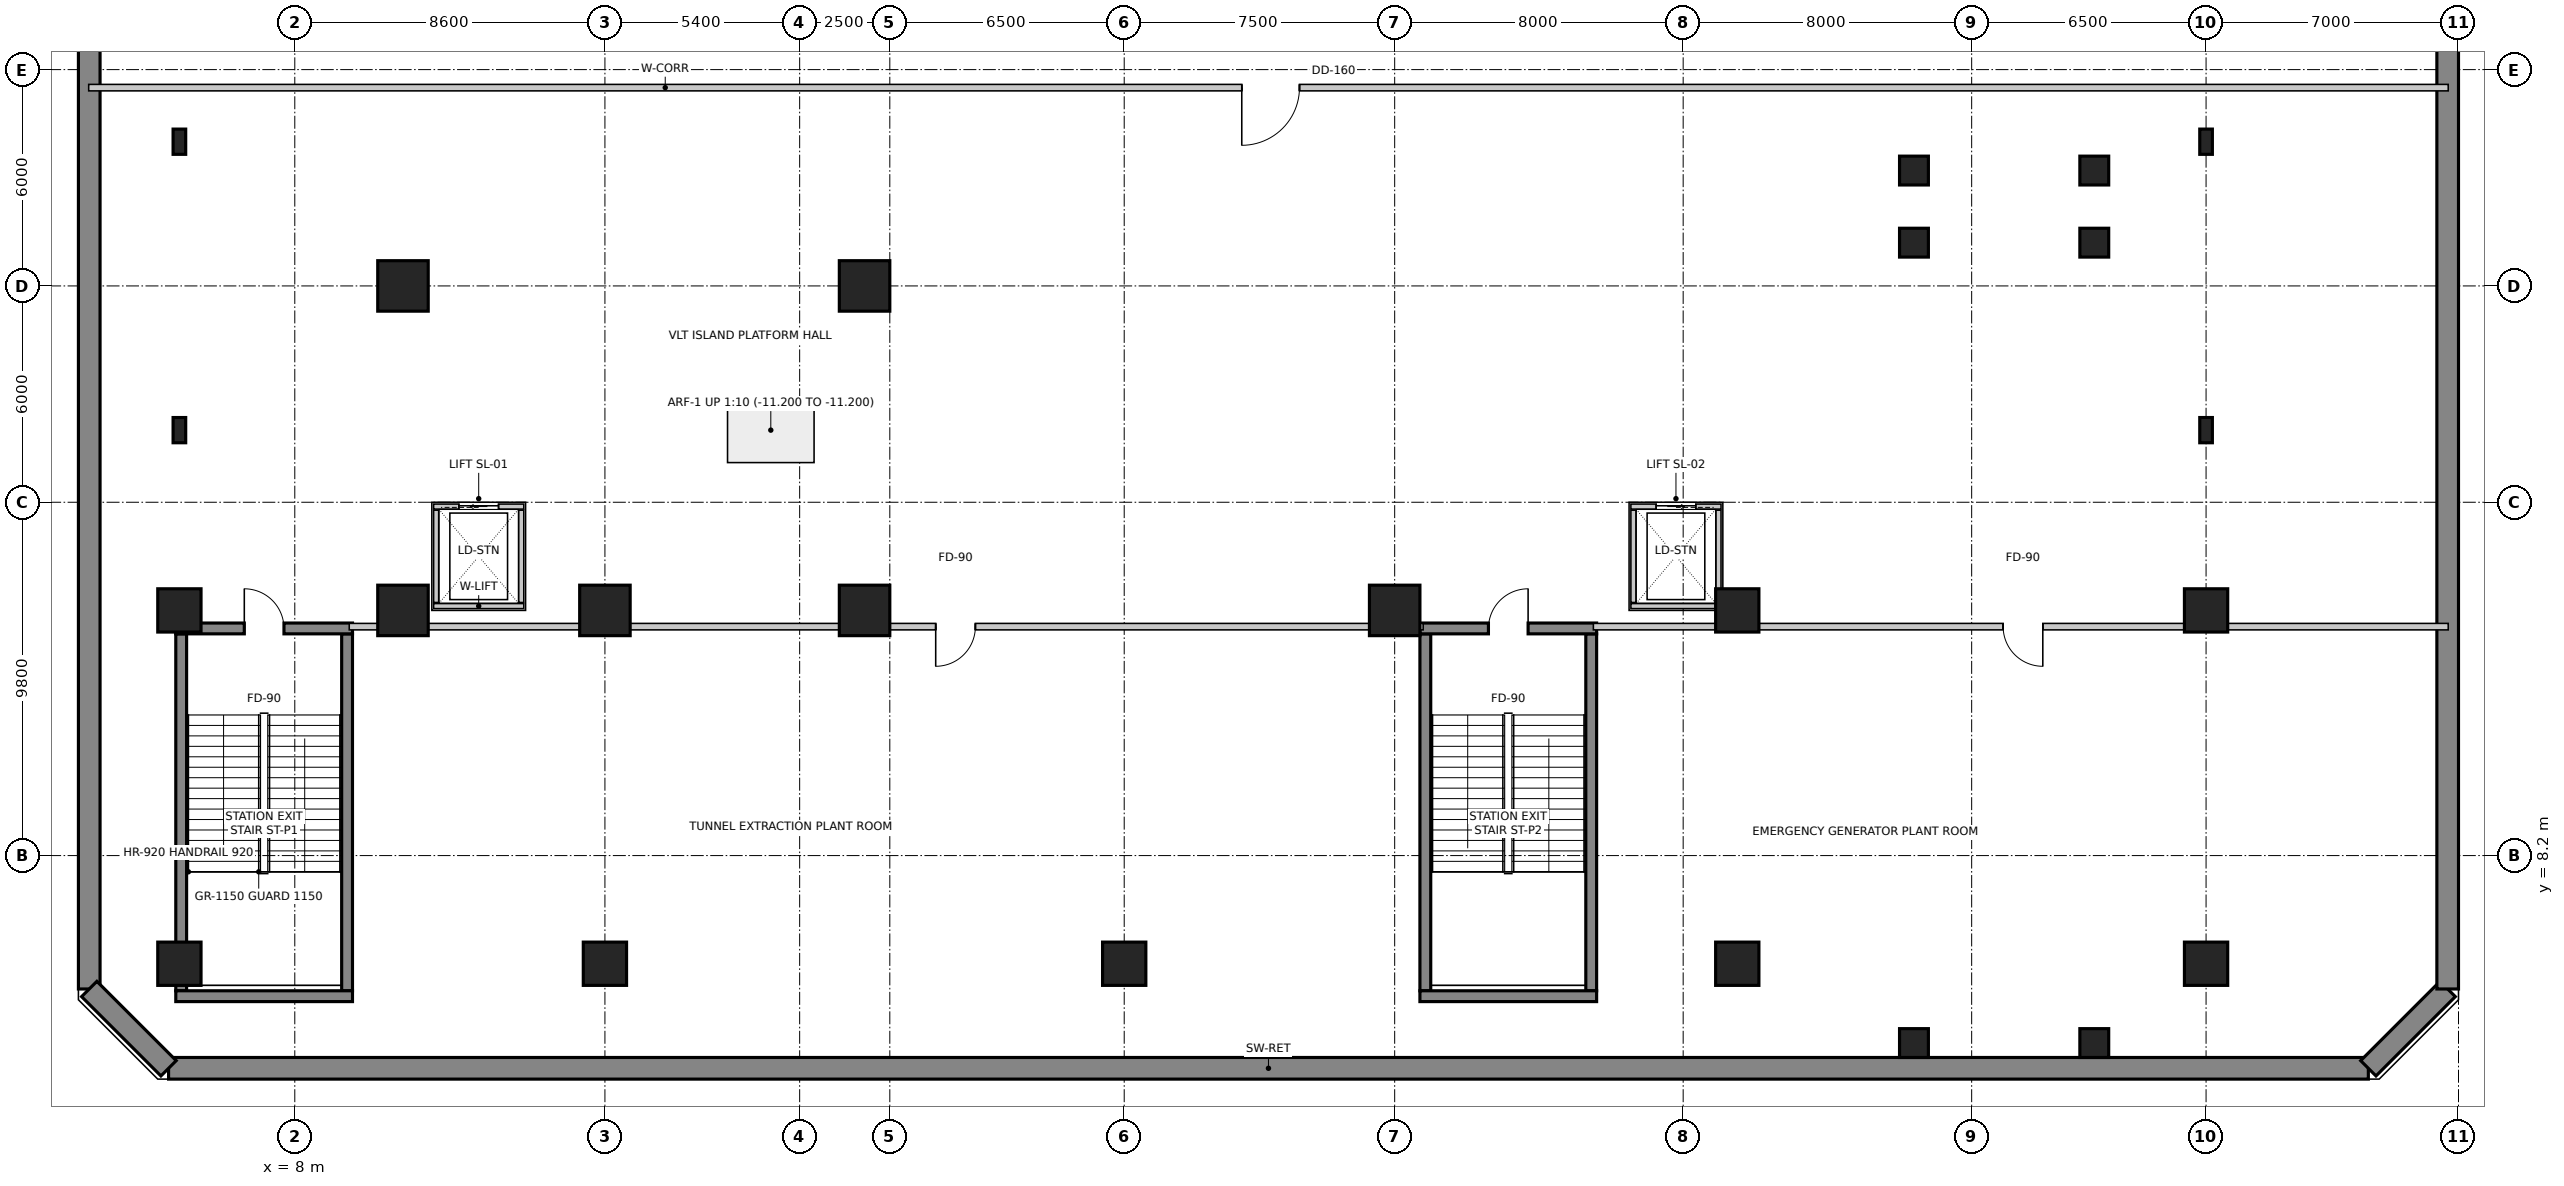
"""IFC4 building model, lengths in metres.
Left out: names, types, materials, properties, quantities, classifications, styles, units other than length and angle.
Written with IfcOpenShell. Run it as: python <this file> out.ifc"""

import sys

from ifc_helpers import new_model, si_unit, direction, frame, frame_2d, origin, origin_2d, place, context, subcontext, project, spatial, rectangle, extrude, source, transform, mapped, element, fill, save


model = new_model("IFC4")
c1 = context("Model", 3, precision=1e-05, world=origin(), true_north=direction((0.0, 1.0)))
c2 = subcontext(c1, "Body", "Model", "MODEL_VIEW")
j1 = project(units=[si_unit("LENGTHUNIT", "METRE"), si_unit("PLANEANGLEUNIT", "RADIAN")], contexts=[c1])
p1 = place(None, origin())
s1 = spatial("IfcSite", under=j1, at=p1, CompositionType="ELEMENT")
p2 = place(p1, origin())
s2 = spatial("IfcBuilding", under=s1, at=p2, CompositionType="ELEMENT")
p3 = place(p2, frame((0.0, 0.0, -11.2)))
s3 = spatial("IfcBuildingStorey", under=s2, at=p3, CompositionType="ELEMENT", Elevation=-11.2)
for number, where, z_axis, x_axis in (
    (1, (4.85, 4.45, 0.0), (0.0, 0.0, 1.0), (0.0, 1.0, 0.0)),
    (2, (9.45, 4.45, 0.0), (0.0, 0.0, 1.0), (0.0, 1.0, 0.0)),
):
    element("IfcWall", number, at=place(p3, frame(where, z_axis=z_axis, x_axis=x_axis)), inside=s3, PredefinedType="SHEAR", context=c2, shape_type="SweptSolid", body=[
        extrude(rectangle(XDim=9.9, YDim=0.3, at=frame_2d((4.95, 0.0))), origin(), (0.0, 0.0, 1.0), 5.8),
    ])
p4 = place(p3, frame((4.7, 4.3, 0.0), z_axis=(0.0, 0.0, 1.0), x_axis=(1.0, 0.0, 0.0)))
e3 = element("IfcWall", 3, at=p4, inside=s3, PredefinedType="SHEAR", context=c2, shape_type="SweptSolid", body=[
    extrude(rectangle(XDim=4.9, YDim=0.3, at=frame_2d((2.45, 0.0))), origin(), (0.0, 0.0, 1.0), 5.8),
])
p5 = place(p3, frame((4.7, 14.5, 0.0), z_axis=(0.0, 0.0, 1.0), x_axis=(1.0, 0.0, 0.0)))
e4 = element("IfcWall", 4, at=p5, inside=s3, PredefinedType="SHEAR", context=c2, shape_type="SweptSolid", body=[
    extrude(rectangle(XDim=4.9, YDim=0.3, at=frame_2d((2.45, 0.0))), origin(), (0.0, 0.0, 1.0), 5.8),
])
m1 = source(origin(), c2, "Body", "SweptSolid", [
    extrude(rectangle(XDim=1.1, YDim=2.15, at=frame_2d((0.55, 1.075))), frame((0.0, 0.16, 0.0), z_axis=(0.0, -1.0, 0.0), x_axis=(1.0, 0.0, 0.0)), (0.0, 0.0, 1.0), 0.32),
])
p6 = place(p5, frame((1.9, 0.0, 0.0)))
e5 = element("IfcOpeningElement", 5, at=p6, cuts=e4, PredefinedType="OPENING", context=c2, shape_type="MappedRepresentation", body=[
    mapped(m1, transform((0.0, 0.0, 0.0), scale=1.0)),
])
for number, where, z_axis, x_axis in (
    (6, (39.35, 4.45, 0.0), (0.0, 0.0, 1.0), (0.0, 1.0, 0.0)),
    (7, (43.95, 4.45, 0.0), (0.0, 0.0, 1.0), (0.0, 1.0, 0.0)),
):
    element("IfcWall", number, at=place(p3, frame(where, z_axis=z_axis, x_axis=x_axis)), inside=s3, PredefinedType="SHEAR", context=c2, shape_type="SweptSolid", body=[
        extrude(rectangle(XDim=9.9, YDim=0.3, at=frame_2d((4.95, 0.0))), origin(), (0.0, 0.0, 1.0), 5.8),
    ])
p7 = place(p3, frame((39.2, 4.3, 0.0), z_axis=(0.0, 0.0, 1.0), x_axis=(1.0, 0.0, 0.0)))
e8 = element("IfcWall", 8, at=p7, inside=s3, PredefinedType="SHEAR", context=c2, shape_type="SweptSolid", body=[
    extrude(rectangle(XDim=4.9, YDim=0.3, at=frame_2d((2.45, 0.0))), origin(), (0.0, 0.0, 1.0), 5.8),
])
p8 = place(p3, frame((39.2, 14.5, 0.0), z_axis=(0.0, 0.0, 1.0), x_axis=(1.0, 0.0, 0.0)))
e9 = element("IfcWall", 9, at=p8, inside=s3, PredefinedType="SHEAR", context=c2, shape_type="SweptSolid", body=[
    extrude(rectangle(XDim=4.9, YDim=0.3, at=frame_2d((2.45, 0.0))), origin(), (0.0, 0.0, 1.0), 5.8),
])
p9 = place(p8, frame((1.9, 0.0, 0.0)))
e10 = element("IfcOpeningElement", 10, at=p9, cuts=e9, PredefinedType="OPENING", context=c2, shape_type="MappedRepresentation", body=[
    mapped(m1, transform((0.0, 0.0, 0.0), scale=1.0)),
])
p10 = place(p3, frame((4.5, 2.3, 0.0), z_axis=(0.0, 0.0, 1.0), x_axis=(1.0, 0.0, 0.0)))
e11 = element("IfcWall", 11, at=p10, inside=s3, PredefinedType="SHEAR", context=c2, shape_type="SweptSolid", body=[
    extrude(rectangle(XDim=61.0, YDim=0.6, at=frame_2d((30.5, 0.0))), origin(), (0.0, 0.0, 1.0), 5.8),
])
p11 = place(p3, frame((65.5, 2.3, 0.0), z_axis=(0.0, 0.0, 1.0), x_axis=(0.707106781187, 0.707106781187, 0.0)))
e12 = element("IfcWall", 12, at=p11, inside=s3, PredefinedType="SHEAR", context=c2, shape_type="SweptSolid", body=[
    extrude(rectangle(XDim=3.111, YDim=0.6, at=frame_2d((1.556, 0.0))), origin(), (0.0, 0.0, 1.0), 5.8),
])
for number, where, z_axis, x_axis in (
    (13, (67.7, 4.5, 0.0), (0.0, 0.0, 1.0), (0.0, 1.0, 0.0)),
    (14, (2.3, 49.5, 0.0), (0.0, 0.0, 1.0), (0.0, -1.0, 0.0)),
):
    element("IfcWall", number, at=place(p3, frame(where, z_axis=z_axis, x_axis=x_axis)), inside=s3, PredefinedType="SHEAR", context=c2, shape_type="SweptSolid", body=[
        extrude(rectangle(XDim=45.0, YDim=0.6, at=frame_2d((22.5, 0.0))), origin(), (0.0, 0.0, 1.0), 5.8),
    ])
p12 = place(p3, frame((2.3, 4.5, 0.0), z_axis=(0.0, 0.0, 1.0), x_axis=(0.707106781187, -0.707106781187, 0.0)))
e15 = element("IfcWall", 15, at=p12, inside=s3, PredefinedType="SHEAR", context=c2, shape_type="SweptSolid", body=[
    extrude(rectangle(XDim=3.111, YDim=0.6, at=frame_2d((1.556, 0.0))), origin(), (0.0, 0.0, 1.0), 5.8),
])
m2 = source(origin(), c2, "Body", "SweptSolid", [
    extrude(rectangle(XDim=1.2, YDim=1.2, at=origin_2d()), origin(), (0.0, 0.0, 1.0), 5.8),
])
for number, where, z_axis, x_axis in (
    (16, (4.8, 5.2, 0.0), (0.0, 0.0, 1.0), (1.0, 0.0, 0.0)),
    (17, (16.6, 5.2, 0.0), (0.0, 0.0, 1.0), (1.0, 0.0, 0.0)),
    (18, (31.0, 5.2, 0.0), (0.0, 0.0, 1.0), (1.0, 0.0, 0.0)),
    (19, (48.0, 5.2, 0.0), (0.0, 0.0, 1.0), (1.0, 0.0, 0.0)),
    (20, (61.0, 5.2, 0.0), (0.0, 0.0, 1.0), (1.0, 0.0, 0.0)),
    (21, (4.8, 15.0, 0.0), (0.0, 0.0, 1.0), (1.0, 0.0, 0.0)),
):
    element("IfcColumn", number, at=place(p3, frame(where, z_axis=z_axis, x_axis=x_axis)), inside=s3, PredefinedType="COLUMN", context=c2, shape_type="MappedRepresentation", body=[
        mapped(m2, transform((0.0, 0.0, 0.0), scale=1.0)),
    ])
m3 = source(origin(), c2, "Body", "SweptSolid", [
    extrude(rectangle(XDim=1.4, YDim=1.4, at=origin_2d()), origin(), (0.0, 0.0, 1.0), 5.8),
])
for number, where, z_axis, x_axis in (
    (22, (11.0, 15.0, 0.0), (0.0, 0.0, 1.0), (1.0, 0.0, 0.0)),
    (23, (16.6, 15.0, 0.0), (0.0, 0.0, 1.0), (1.0, 0.0, 0.0)),
    (24, (23.8, 15.0, 0.0), (0.0, 0.0, 1.0), (1.0, 0.0, 0.0)),
    (25, (38.5, 15.0, 0.0), (0.0, 0.0, 1.0), (1.0, 0.0, 0.0)),
):
    element("IfcColumn", number, at=place(p3, frame(where, z_axis=z_axis, x_axis=x_axis)), inside=s3, PredefinedType="COLUMN", context=c2, shape_type="MappedRepresentation", body=[
        mapped(m3, transform((0.0, 0.0, 0.0), scale=1.0)),
    ])
for number, where, z_axis, x_axis in (
    (26, (48.0, 15.0, 0.0), (0.0, 0.0, 1.0), (1.0, 0.0, 0.0)),
    (27, (61.0, 15.0, 0.0), (0.0, 0.0, 1.0), (1.0, 0.0, 0.0)),
):
    element("IfcColumn", number, at=place(p3, frame(where, z_axis=z_axis, x_axis=x_axis)), inside=s3, PredefinedType="COLUMN", context=c2, shape_type="MappedRepresentation", body=[
        mapped(m2, transform((0.0, 0.0, 0.0), scale=1.0)),
    ])
for number, where, z_axis, x_axis in (
    (28, (11.0, 24.0, 0.0), (0.0, 0.0, 1.0), (1.0, 0.0, 0.0)),
    (29, (23.8, 24.0, 0.0), (0.0, 0.0, 1.0), (1.0, 0.0, 0.0)),
):
    element("IfcColumn", number, at=place(p3, frame(where, z_axis=z_axis, x_axis=x_axis)), inside=s3, PredefinedType="COLUMN", context=c2, shape_type="MappedRepresentation", body=[
        mapped(m3, transform((0.0, 0.0, 0.0), scale=1.0)),
    ])
m4 = source(origin(), c2, "Body", "SweptSolid", [
    extrude(rectangle(XDim=0.35, YDim=0.7, at=origin_2d()), origin(), (0.0, 0.0, 1.0), 5.8),
])
for number, where, z_axis, x_axis in (
    (30, (4.8, 20.0, 0.0), (0.0, 0.0, 1.0), (1.0, 0.0, 0.0)),
    (31, (4.8, 28.0, 0.0), (0.0, 0.0, 1.0), (1.0, 0.0, 0.0)),
    (32, (61.0, 20.0, 0.0), (0.0, 0.0, 1.0), (1.0, 0.0, 0.0)),
    (33, (61.0, 28.0, 0.0), (0.0, 0.0, 1.0), (1.0, 0.0, 0.0)),
):
    element("IfcColumn", number, at=place(p3, frame(where, z_axis=z_axis, x_axis=x_axis)), inside=s3, PredefinedType="PILASTER", context=c2, shape_type="MappedRepresentation", body=[
        mapped(m4, transform((0.0, 0.0, 0.0), scale=1.0)),
    ])
m5 = source(origin(), c2, "Body", "SweptSolid", [
    extrude(rectangle(XDim=0.8, YDim=0.8, at=origin_2d()), origin(), (0.0, 0.0, 1.0), 5.8),
])
for number, where, z_axis, x_axis in (
    (34, (52.9, 3.0, 0.0), (0.0, 0.0, 1.0), (1.0, 0.0, 0.0)),
    (35, (52.9, 25.2, 0.0), (0.0, 0.0, 1.0), (1.0, 0.0, 0.0)),
    (36, (52.9, 27.2, 0.0), (0.0, 0.0, 1.0), (1.0, 0.0, 0.0)),
    (37, (57.9, 3.0, 0.0), (0.0, 0.0, 1.0), (1.0, 0.0, 0.0)),
    (38, (57.9, 25.2, 0.0), (0.0, 0.0, 1.0), (1.0, 0.0, 0.0)),
    (39, (57.9, 27.2, 0.0), (0.0, 0.0, 1.0), (1.0, 0.0, 0.0)),
):
    element("IfcColumn", number, at=place(p3, frame(where, z_axis=z_axis, x_axis=x_axis)), inside=s3, PredefinedType="COLUMN", context=c2, shape_type="MappedRepresentation", body=[
        mapped(m5, transform((0.0, 0.0, 0.0), scale=1.0)),
    ])
p13 = place(p3, frame((11.85, 17.88, 0.0), z_axis=(0.0, 0.0, 1.0), x_axis=(1.0, 0.0, 0.0)))
e40 = element("IfcWall", 40, at=p13, inside=s3, PredefinedType="SOLIDWALL", context=c2, shape_type="SweptSolid", body=[
    extrude(rectangle(XDim=2.5, YDim=0.14, at=frame_2d((1.25, 0.0))), origin(), (0.0, 0.0, 1.0), 5.48),
])
m6 = source(origin(), c2, "Body", "SweptSolid", [
    extrude(rectangle(XDim=1.1, YDim=2.15, at=frame_2d((0.55, 1.075))), frame((0.0, 0.08, 0.0), z_axis=(0.0, -1.0, 0.0), x_axis=(1.0, 0.0, 0.0)), (0.0, 0.0, 1.0), 0.16),
])
p14 = place(p13, frame((0.7, 0.0, 0.0)))
e41 = element("IfcOpeningElement", 41, at=p14, cuts=e40, PredefinedType="OPENING", context=c2, shape_type="MappedRepresentation", body=[
    mapped(m6, transform((0.0, 0.0, 0.0), scale=1.0)),
])
p15 = place(p3, frame((11.85, 15.12, 0.0), z_axis=(0.0, 0.0, 1.0), x_axis=(1.0, 0.0, 0.0)))
e42 = element("IfcWall", 42, at=p15, inside=s3, PredefinedType="SOLIDWALL", context=c2, shape_type="SweptSolid", body=[
    extrude(rectangle(XDim=2.5, YDim=0.14, at=frame_2d((1.25, 0.0))), origin(), (0.0, 0.0, 1.0), 4.272),
])
for number, where, z_axis, x_axis in (
    (43, (11.92, 15.22, 0.0), (0.0, 0.0, 1.0), (0.0, 1.0, 0.0)),
    (44, (14.28, 15.22, 0.0), (0.0, 0.0, 1.0), (0.0, 1.0, 0.0)),
):
    element("IfcWall", number, at=place(p3, frame(where, z_axis=z_axis, x_axis=x_axis)), inside=s3, PredefinedType="SOLIDWALL", context=c2, shape_type="SweptSolid", body=[
        extrude(rectangle(XDim=2.56, YDim=0.14, at=frame_2d((1.28, 0.0))), origin(), (0.0, 0.0, 1.0), 4.272),
    ])
p16 = place(p3, frame((45.05, 17.88, 0.0), z_axis=(0.0, 0.0, 1.0), x_axis=(1.0, 0.0, 0.0)))
e45 = element("IfcWall", 45, at=p16, inside=s3, PredefinedType="SOLIDWALL", context=c2, shape_type="SweptSolid", body=[
    extrude(rectangle(XDim=2.5, YDim=0.14, at=frame_2d((1.25, 0.0))), origin(), (0.0, 0.0, 1.0), 5.48),
])
p17 = place(p16, frame((0.7, 0.0, 0.0)))
e46 = element("IfcOpeningElement", 46, at=p17, cuts=e45, PredefinedType="OPENING", context=c2, shape_type="MappedRepresentation", body=[
    mapped(m6, transform((0.0, 0.0, 0.0), scale=1.0)),
])
p18 = place(p3, frame((45.05, 15.12, 0.0), z_axis=(0.0, 0.0, 1.0), x_axis=(1.0, 0.0, 0.0)))
e47 = element("IfcWall", 47, at=p18, inside=s3, PredefinedType="SOLIDWALL", context=c2, shape_type="SweptSolid", body=[
    extrude(rectangle(XDim=2.5, YDim=0.14, at=frame_2d((1.25, 0.0))), origin(), (0.0, 0.0, 1.0), 4.272),
])
p19 = place(p3, frame((45.12, 15.22, 0.0), z_axis=(0.0, 0.0, 1.0), x_axis=(0.0, 1.0, 0.0)))
e48 = element("IfcWall", 48, at=p19, inside=s3, PredefinedType="SOLIDWALL", context=c2, shape_type="SweptSolid", body=[
    extrude(rectangle(XDim=2.56, YDim=0.14, at=frame_2d((1.28, 0.0))), origin(), (0.0, 0.0, 1.0), 4.272),
])
p20 = place(p3, frame((47.48, 15.22, 0.0), z_axis=(0.0, 0.0, 1.0), x_axis=(0.0, 1.0, 0.0)))
e49 = element("IfcWall", 49, at=p20, inside=s3, PredefinedType="SOLIDWALL", context=c2, shape_type="SweptSolid", body=[
    extrude(rectangle(XDim=2.56, YDim=0.14, at=frame_2d((1.28, 0.0))), origin(), (0.0, 0.0, 1.0), 3.672),
])
p21 = place(p3, frame((67.715, 29.5, 0.0), z_axis=(0.0, 0.0, 1.0), x_axis=(-1.0, 0.0, 0.0)))
e50 = element("IfcWall", 50, at=p21, inside=s3, PredefinedType="PARTITIONING", context=c2, shape_type="SweptSolid", body=[
    extrude(rectangle(XDim=65.43, YDim=0.18, at=frame_2d((32.715, 0.0))), origin(), (0.0, 0.0, 1.0), 3.672),
])
m7 = source(origin(), c2, "Body", "SweptSolid", [
    extrude(rectangle(XDim=1.6, YDim=2.15, at=frame_2d((0.8, 1.075))), frame((0.0, 0.1, 0.0), z_axis=(0.0, -1.0, 0.0), x_axis=(1.0, 0.0, 0.0)), (0.0, 0.0, 1.0), 0.2),
])
p22 = place(p21, frame((31.855, 0.0, 0.0)))
e51 = element("IfcOpeningElement", 51, at=p22, cuts=e50, PredefinedType="OPENING", context=c2, shape_type="MappedRepresentation", body=[
    mapped(m7, transform((0.0, 0.0, 0.0), scale=1.0)),
])
p23 = place(p3, frame((39.29, 14.55, 0.0), z_axis=(0.0, 0.0, 1.0), x_axis=(-1.0, 0.0, 0.0)))
e52 = element("IfcWall", 52, at=p23, inside=s3, PredefinedType="PARTITIONING", context=c2, shape_type="SweptSolid", body=[
    extrude(rectangle(XDim=29.78, YDim=0.18, at=frame_2d((14.89, 0.0))), origin(), (0.0, 0.0, 1.0), 4.522),
])
m8 = source(origin(), c2, "Body", "SweptSolid", [
    extrude(rectangle(XDim=1.1, YDim=2.15, at=frame_2d((0.55, 1.075))), frame((0.0, 0.1, 0.0), z_axis=(0.0, -1.0, 0.0), x_axis=(1.0, 0.0, 0.0)), (0.0, 0.0, 1.0), 0.2),
])
p24 = place(p23, frame((12.417, 0.0, 0.0)))
e53 = element("IfcOpeningElement", 53, at=p24, cuts=e52, PredefinedType="OPENING", context=c2, shape_type="MappedRepresentation", body=[
    mapped(m8, transform((0.0, 0.0, 0.0), scale=1.0)),
])
p25 = place(p3, frame((67.715, 14.55, 0.0), z_axis=(0.0, 0.0, 1.0), x_axis=(-1.0, 0.0, 0.0)))
e54 = element("IfcWall", 54, at=p25, inside=s3, PredefinedType="PARTITIONING", context=c2, shape_type="SweptSolid", body=[
    extrude(rectangle(XDim=23.705, YDim=0.18, at=frame_2d((11.853, 0.0))), origin(), (0.0, 0.0, 1.0), 4.522),
])
p26 = place(p25, frame((11.242, 0.0, 0.0)))
e55 = element("IfcOpeningElement", 55, at=p26, cuts=e54, PredefinedType="OPENING", context=c2, shape_type="MappedRepresentation", body=[
    mapped(m8, transform((0.0, 0.0, 0.0), scale=1.0)),
])
m9 = source(origin(), c2, "Body", "SweptSolid", [
    extrude(rectangle(XDim=1.1, YDim=2.15, at=frame_2d((0.55, 1.075))), frame((0.0, 0.025, 0.0), z_axis=(0.0, -1.0, 0.0), x_axis=(1.0, 0.0, 0.0)), (0.0, 0.0, 1.0), 0.05),
])
p27 = place(p14, origin())
e56 = element("IfcDoor", 56, at=p27, inside=s3, OperationType="SLIDING_TO_LEFT", PredefinedType="DOOR", context=c2, shape_type="MappedRepresentation", body=[
    mapped(m9, transform((0.0, 0.0, 0.0), scale=1.0)),
])
fill(e41, e56)
p28 = place(p17, origin())
e57 = element("IfcDoor", 57, at=p28, inside=s3, OperationType="SLIDING_TO_RIGHT", PredefinedType="DOOR", context=c2, shape_type="MappedRepresentation", body=[
    mapped(m9, transform((0.0, 0.0, 0.0), scale=1.0)),
])
fill(e46, e57)
m10 = source(origin(), c2, "Body", "SweptSolid", [
    extrude(rectangle(XDim=1.1, YDim=2.15, at=frame_2d((0.55, 1.075))), frame((0.0, 0.025, 0.0), z_axis=(0.0, -1.0, 0.0), x_axis=(1.0, 0.0, 0.0)), (0.0, 0.0, 1.0), 0.05),
])
p29 = place(p6, origin())
e58 = element("IfcDoor", 58, at=p29, inside=s3, OperationType="SINGLE_SWING_LEFT", PredefinedType="DOOR", context=c2, shape_type="MappedRepresentation", body=[
    mapped(m10, transform((0.0, 0.0, 0.0), scale=1.0)),
])
fill(e5, e58)
p30 = place(p9, origin())
e59 = element("IfcDoor", 59, at=p30, inside=s3, OperationType="SINGLE_SWING_RIGHT", PredefinedType="DOOR", context=c2, shape_type="MappedRepresentation", body=[
    mapped(m10, transform((0.0, 0.0, 0.0), scale=1.0)),
])
fill(e10, e59)
m11 = source(origin(), c2, "Body", "SweptSolid", [
    extrude(rectangle(XDim=1.6, YDim=2.15, at=frame_2d((0.8, 1.075))), frame((0.0, 0.025, 0.0), z_axis=(0.0, -1.0, 0.0), x_axis=(1.0, 0.0, 0.0)), (0.0, 0.0, 1.0), 0.05),
])
p31 = place(p22, origin())
e60 = element("IfcDoor", 60, at=p31, inside=s3, OperationType="SINGLE_SWING_RIGHT", PredefinedType="DOOR", context=c2, shape_type="MappedRepresentation", body=[
    mapped(m11, transform((0.0, 0.0, 0.0), scale=1.0)),
])
fill(e51, e60)
p32 = place(p24, origin())
e61 = element("IfcDoor", 61, at=p32, inside=s3, OperationType="SINGLE_SWING_RIGHT", PredefinedType="DOOR", context=c2, shape_type="MappedRepresentation", body=[
    mapped(m10, transform((0.0, 0.0, 0.0), scale=1.0)),
])
fill(e53, e61)
p33 = place(p26, origin())
e62 = element("IfcDoor", 62, at=p33, inside=s3, OperationType="SINGLE_SWING_LEFT", PredefinedType="DOOR", context=c2, shape_type="MappedRepresentation", body=[
    mapped(m10, transform((0.0, 0.0, 0.0), scale=1.0)),
])
fill(e55, e62)
save(model, sys.argv[1])
